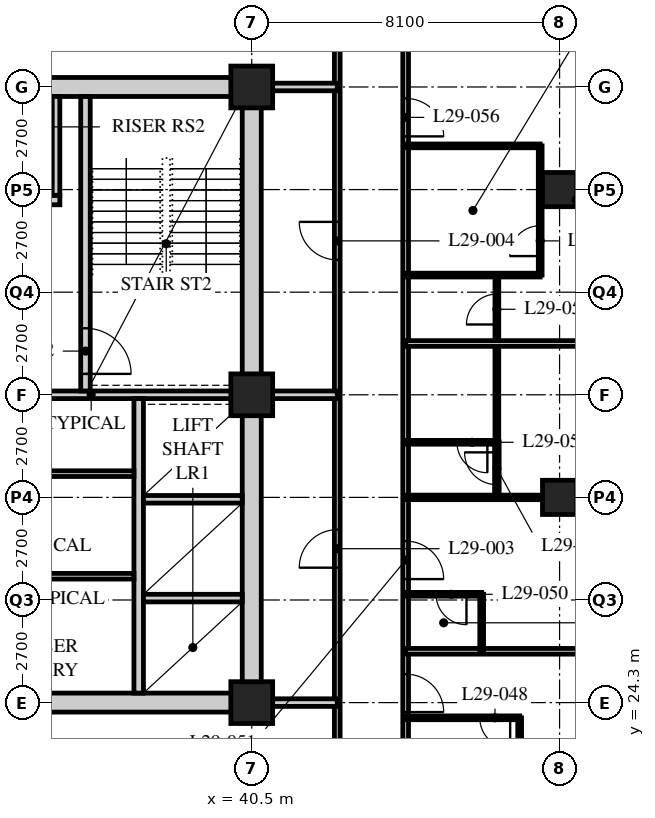
"""IFC4 building model, lengths in metres.
Left out: names, types, materials, properties, quantities, classifications, styles, units other than length and angle.
Written with IfcOpenShell. Run it as: python <this file> out.ifc"""

import sys

from ifc_helpers import new_model, si_unit, direction, frame, frame_2d, origin, origin_2d, place, context, subcontext, project, spatial, rectangle, hollow_rectangle, extrude, element, fill, save


model = new_model("IFC4")
c1 = context("Model", 3, precision=1e-05, world=origin(), true_north=direction((0.0, 1.0)))
c2 = subcontext(c1, "Body", "Model", "MODEL_VIEW")
j1 = project(units=[si_unit("LENGTHUNIT", "METRE"), si_unit("PLANEANGLEUNIT", "RADIAN")], contexts=[c1])
p1 = place(None, origin())
s1 = spatial("IfcSite", under=j1, at=p1, CompositionType="ELEMENT")
p2 = place(p1, origin())
s2 = spatial("IfcBuilding", under=s1, at=p2, CompositionType="ELEMENT")
p3 = place(p2, frame((0.0, 0.0, 117.0)))
s3 = spatial("IfcBuildingStorey", under=s2, at=p3, CompositionType="ELEMENT", Elevation=117.0)
for number, where, z_axis, x_axis in (
    (1, (40.5, 24.3, 0.0), (0.0, 0.0, 1.0), (1.0, 0.0, 0.0)),
    (2, (40.5, 32.4, 0.0), (0.0, 0.0, 1.0), (1.0, 0.0, 0.0)),
    (3, (40.5, 40.5, 0.0), (0.0, 0.0, 1.0), (1.0, 0.0, 0.0)),
):
    element("IfcColumn", number, at=place(p3, frame(where, z_axis=z_axis, x_axis=x_axis)), inside=s3, PredefinedType="COLUMN", context=c2, shape_type="SweptSolid", body=[
        extrude(hollow_rectangle(XDim=1.1, YDim=1.1, WallThickness=0.1, at=origin_2d()), origin(), (0.0, 0.0, 1.0), 3.4),
    ])
for number, where, z_axis, x_axis in (
    (4, (48.6, 29.7, 0.0), (0.0, 0.0, 1.0), (1.0, 0.0, 0.0)),
    (5, (48.6, 37.8, 0.0), (0.0, 0.0, 1.0), (1.0, 0.0, 0.0)),
):
    element("IfcColumn", number, at=place(p3, frame(where, z_axis=z_axis, x_axis=x_axis)), inside=s3, PredefinedType="COLUMN", context=c2, shape_type="SweptSolid", body=[
        extrude(hollow_rectangle(XDim=0.9, YDim=0.9, WallThickness=0.09, at=origin_2d()), origin(), (0.0, 0.0, 1.0), 3.4),
    ])
p4 = place(p3, frame((44.55, 17.55, 0.0), z_axis=(0.0, 0.0, 1.0), x_axis=(0.0, 1.0, 0.0)))
e6 = element("IfcWall", 6, at=p4, inside=s3, PredefinedType="PARTITIONING", context=c2, shape_type="SweptSolid", body=[
    extrude(rectangle(XDim=28.35, YDim=0.15, at=frame_2d((14.175, 0.0))), origin(), (0.0, 0.0, 1.0), 3.19),
])
p5 = place(p4, frame((2.75, 0.0, 0.0)))
e7 = element("IfcOpeningElement", 7, at=p5, cuts=e6, PredefinedType="OPENING", context=c2, shape_type="SweptSolid", body=[
    extrude(rectangle(XDim=1.0, YDim=2.1, at=frame_2d((0.5, 1.05))), frame((0.0, 0.085, 0.0), z_axis=(0.0, -1.0, 0.0), x_axis=(1.0, 0.0, 0.0)), (0.0, 0.0, 1.0), 0.17),
])
p6 = place(p4, frame((6.5, 0.0, 0.0)))
e8 = element("IfcOpeningElement", 8, at=p6, cuts=e6, PredefinedType="OPENING", context=c2, shape_type="SweptSolid", body=[
    extrude(rectangle(XDim=1.0, YDim=2.1, at=frame_2d((0.5, 1.05))), frame((0.0, 0.085, 0.0), z_axis=(0.0, -1.0, 0.0), x_axis=(1.0, 0.0, 0.0)), (0.0, 0.0, 1.0), 0.17),
])
p7 = place(p4, frame((10.0, 0.0, 0.0)))
e9 = element("IfcOpeningElement", 9, at=p7, cuts=e6, PredefinedType="OPENING", context=c2, shape_type="SweptSolid", body=[
    extrude(rectangle(XDim=1.0, YDim=2.1, at=frame_2d((0.5, 1.05))), frame((0.0, 0.085, 0.0), z_axis=(0.0, -1.0, 0.0), x_axis=(1.0, 0.0, 0.0)), (0.0, 0.0, 1.0), 0.17),
])
p8 = place(p4, frame((21.65, 0.0, 0.0)))
e10 = element("IfcOpeningElement", 10, at=p8, cuts=e6, PredefinedType="OPENING", context=c2, shape_type="SweptSolid", body=[
    extrude(rectangle(XDim=1.0, YDim=2.1, at=frame_2d((0.5, 1.05))), frame((0.0, 0.085, 0.0), z_axis=(0.0, -1.0, 0.0), x_axis=(1.0, 0.0, 0.0)), (0.0, 0.0, 1.0), 0.17),
])
p9 = place(p4, frame((26.75, 0.0, 0.0)))
e11 = element("IfcOpeningElement", 11, at=p9, cuts=e6, PredefinedType="OPENING", context=c2, shape_type="SweptSolid", body=[
    extrude(rectangle(XDim=1.0, YDim=2.1, at=frame_2d((0.5, 1.05))), frame((0.0, 0.085, 0.0), z_axis=(0.0, -1.0, 0.0), x_axis=(1.0, 0.0, 0.0)), (0.0, 0.0, 1.0), 0.17),
])
p10 = place(p3, frame((42.75, 19.35, 0.0), z_axis=(0.0, 0.0, 1.0), x_axis=(0.0, 1.0, 0.0)))
e12 = element("IfcWall", 12, at=p10, inside=s3, PredefinedType="PARTITIONING", context=c2, shape_type="SweptSolid", body=[
    extrude(rectangle(XDim=24.75, YDim=0.15, at=frame_2d((12.375, 0.0))), origin(), (0.0, 0.0, 1.0), 3.19),
])
p11 = place(p10, frame((8.5, 0.0, 0.0)))
e13 = element("IfcOpeningElement", 13, at=p11, cuts=e12, PredefinedType="OPENING", context=c2, shape_type="SweptSolid", body=[
    extrude(rectangle(XDim=1.0, YDim=2.1, at=frame_2d((0.5, 1.05))), frame((0.0, 0.085, 0.0), z_axis=(0.0, -1.0, 0.0), x_axis=(1.0, 0.0, 0.0)), (0.0, 0.0, 1.0), 0.17),
])
p12 = place(p10, frame((16.6, 0.0, 0.0)))
e14 = element("IfcOpeningElement", 14, at=p12, cuts=e12, PredefinedType="OPENING", context=c2, shape_type="SweptSolid", body=[
    extrude(rectangle(XDim=1.0, YDim=2.1, at=frame_2d((0.5, 1.05))), frame((0.0, 0.085, 0.0), z_axis=(0.0, -1.0, 0.0), x_axis=(1.0, 0.0, 0.0)), (0.0, 0.0, 1.0), 0.17),
])
for number, where, z_axis, x_axis in (
    (15, (40.5, 32.4, 0.0), (0.0, 0.0, 1.0), (1.0, 0.0, 0.0)),
    (16, (40.5, 24.3, 0.0), (0.0, 0.0, 1.0), (1.0, 0.0, 0.0)),
    (17, (40.5, 40.5, 0.0), (0.0, 0.0, 1.0), (1.0, 0.0, 0.0)),
):
    element("IfcWall", number, at=place(p3, frame(where, z_axis=z_axis, x_axis=x_axis)), inside=s3, PredefinedType="SOLIDWALL", context=c2, shape_type="SweptSolid", body=[
        extrude(rectangle(XDim=2.25, YDim=0.2, at=frame_2d((1.125, 0.0))), origin(), (0.0, 0.0, 1.0), 3.19),
    ])
p13 = place(p3, frame((47.55, 21.6, 0.0), z_axis=(0.0, 0.0, 1.0), x_axis=(0.0, 1.0, 0.0)))
e18 = element("IfcWall", 18, at=p13, inside=s3, PredefinedType="PARTITIONING", context=c2, shape_type="SweptSolid", body=[
    extrude(rectangle(XDim=2.3, YDim=0.1, at=frame_2d((1.15, 0.0))), origin(), (0.0, 0.0, 1.0), 3.19),
])
p14 = place(p3, frame((44.55, 23.9, 0.0), z_axis=(0.0, 0.0, 1.0), x_axis=(1.0, 0.0, 0.0)))
e19 = element("IfcWall", 19, at=p14, inside=s3, PredefinedType="PARTITIONING", context=c2, shape_type="SweptSolid", body=[
    extrude(rectangle(XDim=3.0, YDim=0.1, at=frame_2d((1.5, 0.0))), origin(), (0.0, 0.0, 1.0), 3.19),
])
p15 = place(p14, frame((1.95, 0.0, 0.0)))
e20 = element("IfcOpeningElement", 20, at=p15, cuts=e19, PredefinedType="OPENING", context=c2, shape_type="SweptSolid", body=[
    extrude(rectangle(XDim=0.8, YDim=2.1, at=frame_2d((0.4, 1.05))), frame((0.0, 0.06, 0.0), z_axis=(0.0, -1.0, 0.0), x_axis=(1.0, 0.0, 0.0)), (0.0, 0.0, 1.0), 0.12),
])
p16 = place(p3, frame((44.55, 25.65, 0.0), z_axis=(0.0, 0.0, 1.0), x_axis=(1.0, 0.0, 0.0)))
e21 = element("IfcWall", 21, at=p16, inside=s3, PredefinedType="PARTITIONING", context=c2, shape_type="SweptSolid", body=[
    extrude(rectangle(XDim=11.85, YDim=0.15, at=frame_2d((5.925, 0.0))), origin(), (0.0, 0.0, 1.0), 3.19),
])
p17 = place(p3, frame((46.55, 25.65, 0.0), z_axis=(0.0, 0.0, 1.0), x_axis=(0.0, 1.0, 0.0)))
e22 = element("IfcWall", 22, at=p17, inside=s3, PredefinedType="PARTITIONING", context=c2, shape_type="SweptSolid", body=[
    extrude(rectangle(XDim=1.5, YDim=0.1, at=frame_2d((0.75, 0.0))), origin(), (0.0, 0.0, 1.0), 3.19),
])
p18 = place(p3, frame((44.55, 27.15, 0.0), z_axis=(0.0, 0.0, 1.0), x_axis=(1.0, 0.0, 0.0)))
e23 = element("IfcWall", 23, at=p18, inside=s3, PredefinedType="PARTITIONING", context=c2, shape_type="SweptSolid", body=[
    extrude(rectangle(XDim=2.0, YDim=0.1, at=frame_2d((1.0, 0.0))), origin(), (0.0, 0.0, 1.0), 3.19),
])
p19 = place(p18, frame((0.8, 0.0, 0.0)))
e24 = element("IfcOpeningElement", 24, at=p19, cuts=e23, PredefinedType="OPENING", context=c2, shape_type="SweptSolid", body=[
    extrude(rectangle(XDim=0.8, YDim=2.1, at=frame_2d((0.4, 1.05))), frame((0.0, 0.06, 0.0), z_axis=(0.0, -1.0, 0.0), x_axis=(1.0, 0.0, 0.0)), (0.0, 0.0, 1.0), 0.12),
])
p20 = place(p3, frame((46.95, 31.15, 0.0), z_axis=(0.0, 0.0, 1.0), x_axis=(0.0, 1.0, 0.0)))
e25 = element("IfcWall", 25, at=p20, inside=s3, PredefinedType="PARTITIONING", context=c2, shape_type="SweptSolid", body=[
    extrude(rectangle(XDim=4.4, YDim=0.1, at=frame_2d((2.2, 0.0))), origin(), (0.0, 0.0, 1.0), 3.19),
])
p21 = place(p20, frame((3.1, 0.0, 0.0)))
e26 = element("IfcOpeningElement", 26, at=p21, cuts=e25, PredefinedType="OPENING", context=c2, shape_type="SweptSolid", body=[
    extrude(rectangle(XDim=0.8, YDim=2.1, at=frame_2d((0.4, 1.05))), frame((0.0, 0.06, 0.0), z_axis=(0.0, -1.0, 0.0), x_axis=(1.0, 0.0, 0.0)), (0.0, 0.0, 1.0), 0.12),
])
p22 = place(p3, frame((44.55, 31.15, 0.0), z_axis=(0.0, 0.0, 1.0), x_axis=(1.0, 0.0, 0.0)))
e27 = element("IfcWall", 27, at=p22, inside=s3, PredefinedType="PARTITIONING", context=c2, shape_type="SweptSolid", body=[
    extrude(rectangle(XDim=2.4, YDim=0.1, at=frame_2d((1.2, 0.0))), origin(), (0.0, 0.0, 1.0), 3.19),
])
p23 = place(p22, frame((1.35, 0.0, 0.0)))
e28 = element("IfcOpeningElement", 28, at=p23, cuts=e27, PredefinedType="OPENING", context=c2, shape_type="SweptSolid", body=[
    extrude(rectangle(XDim=0.8, YDim=2.1, at=frame_2d((0.4, 1.05))), frame((0.0, 0.06, 0.0), z_axis=(0.0, -1.0, 0.0), x_axis=(1.0, 0.0, 0.0)), (0.0, 0.0, 1.0), 0.12),
])
p24 = place(p3, frame((44.55, 29.7, 0.0), z_axis=(0.0, 0.0, 1.0), x_axis=(1.0, 0.0, 0.0)))
e29 = element("IfcWall", 29, at=p24, inside=s3, PredefinedType="PARTITIONING", context=c2, shape_type="SweptSolid", body=[
    extrude(rectangle(XDim=11.85, YDim=0.12, at=frame_2d((5.925, 0.0))), origin(), (0.0, 0.0, 1.0), 2.578),
])
p25 = place(p24, frame((6.85, 0.0, 0.0)))
e30 = element("IfcOpeningElement", 30, at=p25, cuts=e29, PredefinedType="OPENING", context=c2, shape_type="SweptSolid", body=[
    extrude(rectangle(XDim=0.85, YDim=2.1, at=frame_2d((0.425, 1.05))), frame((0.0, 0.07, 0.0), z_axis=(0.0, -1.0, 0.0), x_axis=(1.0, 0.0, 0.0)), (0.0, 0.0, 1.0), 0.14),
])
p26 = place(p3, frame((44.55, 33.75, 0.0), z_axis=(0.0, 0.0, 1.0), x_axis=(1.0, 0.0, 0.0)))
e31 = element("IfcWall", 31, at=p26, inside=s3, PredefinedType="PARTITIONING", context=c2, shape_type="SweptSolid", body=[
    extrude(rectangle(XDim=11.85, YDim=0.15, at=frame_2d((5.925, 0.0))), origin(), (0.0, 0.0, 1.0), 3.19),
])
p27 = place(p3, frame((48.09, 35.55, 0.0), z_axis=(0.0, 0.0, 1.0), x_axis=(0.0, 1.0, 0.0)))
e32 = element("IfcWall", 32, at=p27, inside=s3, PredefinedType="PARTITIONING", context=c2, shape_type="SweptSolid", body=[
    extrude(rectangle(XDim=3.4, YDim=0.1, at=frame_2d((1.7, 0.0))), origin(), (0.0, 0.0, 1.0), 3.19),
])
p28 = place(p27, frame((0.5, 0.0, 0.0)))
e33 = element("IfcOpeningElement", 33, at=p28, cuts=e32, PredefinedType="OPENING", context=c2, shape_type="SweptSolid", body=[
    extrude(rectangle(XDim=0.8, YDim=2.1, at=frame_2d((0.4, 1.05))), frame((0.0, 0.06, 0.0), z_axis=(0.0, -1.0, 0.0), x_axis=(1.0, 0.0, 0.0)), (0.0, 0.0, 1.0), 0.12),
])
for number, where, z_axis, x_axis in (
    (34, (44.55, 35.55, 0.0), (0.0, 0.0, 1.0), (1.0, 0.0, 0.0)),
    (35, (44.55, 38.95, 0.0), (0.0, 0.0, 1.0), (1.0, 0.0, 0.0)),
):
    element("IfcWall", number, at=place(p3, frame(where, z_axis=z_axis, x_axis=x_axis)), inside=s3, PredefinedType="PARTITIONING", context=c2, shape_type="SweptSolid", body=[
        extrude(rectangle(XDim=3.54, YDim=0.1, at=frame_2d((1.77, 0.0))), origin(), (0.0, 0.0, 1.0), 3.19),
    ])
p29 = place(p3, frame((46.95, 31.16, 0.0), z_axis=(0.0, 0.0, 1.0), x_axis=(0.0, -1.0, 0.0)))
e36 = element("IfcWall", 36, at=p29, inside=s3, PredefinedType="PARTITIONING", context=c2, shape_type="SweptSolid", body=[
    extrude(rectangle(XDim=1.46, YDim=0.12, at=frame_2d((0.73, 0.0))), origin(), (0.0, 0.0, 1.0), 3.19),
])
p30 = place(p29, frame((0.275, 0.0, 0.0)))
e37 = element("IfcOpeningElement", 37, at=p30, cuts=e36, PredefinedType="OPENING", context=c2, shape_type="SweptSolid", body=[
    extrude(rectangle(XDim=0.85, YDim=2.1, at=frame_2d((0.425, 1.05))), frame((0.0, 0.07, 0.0), z_axis=(0.0, -1.0, 0.0), x_axis=(1.0, 0.0, 0.0)), (0.0, 0.0, 1.0), 0.14),
])
p31 = place(p3, frame((15.95, 24.3, 0.0), z_axis=(0.0, 0.0, 1.0), x_axis=(1.0, 0.0, 0.0)))
e38 = element("IfcWall", 38, at=p31, inside=s3, PredefinedType="SOLIDWALL", context=c2, shape_type="SweptSolid", body=[
    extrude(rectangle(XDim=24.8, YDim=0.5, at=frame_2d((12.4, 0.0))), origin(), (0.0, 0.0, 1.0), 2.54),
])
p32 = place(p31, frame((11.5, 0.0, 0.0)))
e39 = element("IfcOpeningElement", 39, at=p32, cuts=e38, PredefinedType="OPENING", context=c2, shape_type="SweptSolid", body=[
    extrude(rectangle(XDim=1.8, YDim=2.4, at=frame_2d((0.9, 1.2))), frame((0.0, 0.26, 0.0), z_axis=(0.0, -1.0, 0.0), x_axis=(1.0, 0.0, 0.0)), (0.0, 0.0, 1.0), 0.52),
])
p33 = place(p3, frame((15.95, 40.5, 0.0), z_axis=(0.0, 0.0, 1.0), x_axis=(1.0, 0.0, 0.0)))
e40 = element("IfcWall", 40, at=p33, inside=s3, PredefinedType="SOLIDWALL", context=c2, shape_type="SweptSolid", body=[
    extrude(rectangle(XDim=24.8, YDim=0.5, at=frame_2d((12.4, 0.0))), origin(), (0.0, 0.0, 1.0), 2.54),
])
p34 = place(p33, frame((11.5, 0.0, 0.0)))
e41 = element("IfcOpeningElement", 41, at=p34, cuts=e40, PredefinedType="OPENING", context=c2, shape_type="SweptSolid", body=[
    extrude(rectangle(XDim=1.8, YDim=2.4, at=frame_2d((0.9, 1.2))), frame((0.0, 0.26, 0.0), z_axis=(0.0, -1.0, 0.0), x_axis=(1.0, 0.0, 0.0)), (0.0, 0.0, 1.0), 0.52),
])
p35 = place(p3, frame((40.5, 24.55, 0.0), z_axis=(0.0, 0.0, 1.0), x_axis=(0.0, 1.0, 0.0)))
e42 = element("IfcWall", 42, at=p35, inside=s3, PredefinedType="SOLIDWALL", context=c2, shape_type="SweptSolid", body=[
    extrude(rectangle(XDim=15.7, YDim=0.5, at=frame_2d((7.85, 0.0))), origin(), (0.0, 0.0, 1.0), 2.578),
])
p36 = place(p3, frame((32.3, 32.4, 0.0), z_axis=(0.0, 0.0, 1.0), x_axis=(1.0, 0.0, 0.0)))
e43 = element("IfcWall", 43, at=p36, inside=s3, PredefinedType="SOLIDWALL", context=c2, shape_type="SweptSolid", body=[
    extrude(rectangle(XDim=7.95, YDim=0.2, at=frame_2d((3.975, 0.0))), origin(), (0.0, 0.0, 1.0), 2.578),
])
p37 = place(p3, frame((37.525, 24.55, 0.0), z_axis=(0.0, 0.0, 1.0), x_axis=(0.0, 1.0, 0.0)))
e44 = element("IfcWall", 44, at=p37, inside=s3, PredefinedType="SOLIDWALL", context=c2, shape_type="SweptSolid", body=[
    extrude(rectangle(XDim=7.75, YDim=0.25, at=frame_2d((3.875, 0.0))), origin(), (0.0, 0.0, 1.0), 3.19),
])
for number, where, z_axis, x_axis in (
    (45, (37.65, 27.05, 0.0), (0.0, 0.0, 1.0), (1.0, 0.0, 0.0)),
    (46, (37.65, 29.65, 0.0), (0.0, 0.0, 1.0), (1.0, 0.0, 0.0)),
):
    element("IfcWall", number, at=place(p3, frame(where, z_axis=z_axis, x_axis=x_axis)), inside=s3, PredefinedType="SOLIDWALL", context=c2, shape_type="SweptSolid", body=[
        extrude(rectangle(XDim=2.6, YDim=0.2, at=frame_2d((1.3, 0.0))), origin(), (0.0, 0.0, 1.0), 3.19),
    ])
p38 = place(p3, frame((36.125, 32.5, 0.0), z_axis=(0.0, 0.0, 1.0), x_axis=(0.0, 1.0, 0.0)))
e47 = element("IfcWall", 47, at=p38, inside=s3, PredefinedType="SOLIDWALL", context=c2, shape_type="SweptSolid", body=[
    extrude(rectangle(XDim=7.75, YDim=0.25, at=frame_2d((3.875, 0.0))), origin(), (0.0, 0.0, 1.0), 3.19),
])
p39 = place(p38, frame((0.45, 0.0, 0.0)))
e48 = element("IfcOpeningElement", 48, at=p39, cuts=e47, PredefinedType="OPENING", context=c2, shape_type="SweptSolid", body=[
    extrude(rectangle(XDim=1.2, YDim=2.1, at=frame_2d((0.6, 1.05))), frame((0.0, 0.135, 0.0), z_axis=(0.0, -1.0, 0.0), x_axis=(1.0, 0.0, 0.0)), (0.0, 0.0, 1.0), 0.27),
])
p40 = place(p3, frame((32.5, 37.525, 0.0), z_axis=(0.0, 0.0, 1.0), x_axis=(1.0, 0.0, 0.0)))
e49 = element("IfcWall", 49, at=p40, inside=s3, PredefinedType="SOLIDWALL", context=c2, shape_type="SweptSolid", body=[
    extrude(rectangle(XDim=2.95, YDim=0.25, at=frame_2d((1.475, 0.0))), origin(), (0.0, 0.0, 1.0), 3.19),
])
p41 = place(p40, frame((0.9, 0.0, 0.0)))
e50 = element("IfcOpeningElement", 50, at=p41, cuts=e49, PredefinedType="OPENING", context=c2, shape_type="SweptSolid", body=[
    extrude(rectangle(XDim=1.1, YDim=2.4, at=frame_2d((0.55, 1.2))), frame((0.0, 0.135, 0.0), z_axis=(0.0, -1.0, 0.0), x_axis=(1.0, 0.0, 0.0)), (0.0, 0.0, 1.0), 0.27),
])
p42 = place(p3, frame((35.35, 37.65, 0.0), z_axis=(0.0, 0.0, 1.0), x_axis=(0.0, 1.0, 0.0)))
e51 = element("IfcWall", 51, at=p42, inside=s3, PredefinedType="SOLIDWALL", context=c2, shape_type="SweptSolid", body=[
    extrude(rectangle(XDim=2.6, YDim=0.2, at=frame_2d((1.3, 0.0))), origin(), (0.0, 0.0, 1.0), 3.19),
])
for number, where, z_axis, x_axis in (
    (52, (32.5, 27.625, 0.0), (0.0, 0.0, 1.0), (1.0, 0.0, 0.0)),
    (53, (32.5, 30.325, 0.0), (0.0, 0.0, 1.0), (1.0, 0.0, 0.0)),
):
    element("IfcWall", number, at=place(p3, frame(where, z_axis=z_axis, x_axis=x_axis)), inside=s3, PredefinedType="PARTITIONING", context=c2, shape_type="SweptSolid", body=[
        extrude(rectangle(XDim=4.9, YDim=0.15, at=frame_2d((2.45, 0.0))), origin(), (0.0, 0.0, 1.0), 3.19),
    ])
p43 = place(p11, origin())
e54 = element("IfcDoor", 54, at=p43, inside=s3, OperationType="SINGLE_SWING_LEFT", PredefinedType="DOOR", context=c2, shape_type="SweptSolid", body=[
    extrude(rectangle(XDim=1.0, YDim=2.1, at=frame_2d((0.5, 1.05))), frame((0.0, 0.025, 0.0), z_axis=(0.0, -1.0, 0.0), x_axis=(1.0, 0.0, 0.0)), (0.0, 0.0, 1.0), 0.05),
])
fill(e13, e54)
p44 = place(p12, origin())
e55 = element("IfcDoor", 55, at=p44, inside=s3, OperationType="SINGLE_SWING_RIGHT", PredefinedType="DOOR", context=c2, shape_type="SweptSolid", body=[
    extrude(rectangle(XDim=1.0, YDim=2.1, at=frame_2d((0.5, 1.05))), frame((0.0, 0.025, 0.0), z_axis=(0.0, -1.0, 0.0), x_axis=(1.0, 0.0, 0.0)), (0.0, 0.0, 1.0), 0.05),
])
fill(e14, e55)
p45 = place(p15, origin())
e56 = element("IfcDoor", 56, at=p45, inside=s3, OperationType="SINGLE_SWING_LEFT", PredefinedType="DOOR", context=c2, shape_type="SweptSolid", body=[
    extrude(rectangle(XDim=0.8, YDim=2.1, at=frame_2d((0.4, 1.05))), frame((0.0, 0.025, 0.0), z_axis=(0.0, -1.0, 0.0), x_axis=(1.0, 0.0, 0.0)), (0.0, 0.0, 1.0), 0.05),
])
fill(e20, e56)
p46 = place(p6, origin())
e57 = element("IfcDoor", 57, at=p46, inside=s3, OperationType="SINGLE_SWING_RIGHT", PredefinedType="DOOR", context=c2, shape_type="SweptSolid", body=[
    extrude(rectangle(XDim=1.0, YDim=2.1, at=frame_2d((0.5, 1.05))), frame((0.0, 0.025, 0.0), z_axis=(0.0, -1.0, 0.0), x_axis=(1.0, 0.0, 0.0)), (0.0, 0.0, 1.0), 0.05),
])
fill(e8, e57)
p47 = place(p19, origin())
e58 = element("IfcDoor", 58, at=p47, inside=s3, OperationType="SINGLE_SWING_LEFT", PredefinedType="DOOR", context=c2, shape_type="SweptSolid", body=[
    extrude(rectangle(XDim=0.8, YDim=2.1, at=frame_2d((0.4, 1.05))), frame((0.0, 0.025, 0.0), z_axis=(0.0, -1.0, 0.0), x_axis=(1.0, 0.0, 0.0)), (0.0, 0.0, 1.0), 0.05),
])
fill(e24, e58)
p48 = place(p7, origin())
e59 = element("IfcDoor", 59, at=p48, inside=s3, OperationType="SINGLE_SWING_RIGHT", PredefinedType="DOOR", context=c2, shape_type="SweptSolid", body=[
    extrude(rectangle(XDim=1.0, YDim=2.1, at=frame_2d((0.5, 1.05))), frame((0.0, 0.025, 0.0), z_axis=(0.0, -1.0, 0.0), x_axis=(1.0, 0.0, 0.0)), (0.0, 0.0, 1.0), 0.05),
])
fill(e9, e59)
p49 = place(p23, origin())
e60 = element("IfcDoor", 60, at=p49, inside=s3, OperationType="SINGLE_SWING_LEFT", PredefinedType="DOOR", context=c2, shape_type="SweptSolid", body=[
    extrude(rectangle(XDim=0.8, YDim=2.1, at=frame_2d((0.4, 1.05))), frame((0.0, 0.025, 0.0), z_axis=(0.0, -1.0, 0.0), x_axis=(1.0, 0.0, 0.0)), (0.0, 0.0, 1.0), 0.05),
])
fill(e28, e60)
p50 = place(p28, origin())
e61 = element("IfcDoor", 61, at=p50, inside=s3, OperationType="SINGLE_SWING_LEFT", PredefinedType="DOOR", context=c2, shape_type="SweptSolid", body=[
    extrude(rectangle(XDim=0.8, YDim=2.1, at=frame_2d((0.4, 1.05))), frame((0.0, 0.025, 0.0), z_axis=(0.0, -1.0, 0.0), x_axis=(1.0, 0.0, 0.0)), (0.0, 0.0, 1.0), 0.05),
])
fill(e33, e61)
p51 = place(p21, origin())
e62 = element("IfcDoor", 62, at=p51, inside=s3, OperationType="SINGLE_SWING_LEFT", PredefinedType="DOOR", context=c2, shape_type="SweptSolid", body=[
    extrude(rectangle(XDim=0.8, YDim=2.1, at=frame_2d((0.4, 1.05))), frame((0.0, 0.025, 0.0), z_axis=(0.0, -1.0, 0.0), x_axis=(1.0, 0.0, 0.0)), (0.0, 0.0, 1.0), 0.05),
])
fill(e26, e62)
p52 = place(p8, origin())
e63 = element("IfcDoor", 63, at=p52, inside=s3, OperationType="SINGLE_SWING_RIGHT", PredefinedType="DOOR", context=c2, shape_type="SweptSolid", body=[
    extrude(rectangle(XDim=1.0, YDim=2.1, at=frame_2d((0.5, 1.05))), frame((0.0, 0.025, 0.0), z_axis=(0.0, -1.0, 0.0), x_axis=(1.0, 0.0, 0.0)), (0.0, 0.0, 1.0), 0.05),
])
fill(e10, e63)
p53 = place(p30, origin())
e64 = element("IfcDoor", 64, at=p53, inside=s3, OperationType="SINGLE_SWING_RIGHT", PredefinedType="DOOR", context=c2, shape_type="SweptSolid", body=[
    extrude(rectangle(XDim=0.85, YDim=2.1, at=frame_2d((0.425, 1.05))), frame((0.0, 0.025, 0.0), z_axis=(0.0, -1.0, 0.0), x_axis=(1.0, 0.0, 0.0)), (0.0, 0.0, 1.0), 0.05),
])
fill(e37, e64)
p54 = place(p39, origin())
e65 = element("IfcDoor", 65, at=p54, inside=s3, OperationType="SINGLE_SWING_RIGHT", PredefinedType="DOOR", context=c2, shape_type="SweptSolid", body=[
    extrude(rectangle(XDim=1.2, YDim=2.1, at=frame_2d((0.6, 1.05))), frame((0.0, 0.025, 0.0), z_axis=(0.0, -1.0, 0.0), x_axis=(1.0, 0.0, 0.0)), (0.0, 0.0, 1.0), 0.05),
])
fill(e48, e65)
save(model, sys.argv[1])
